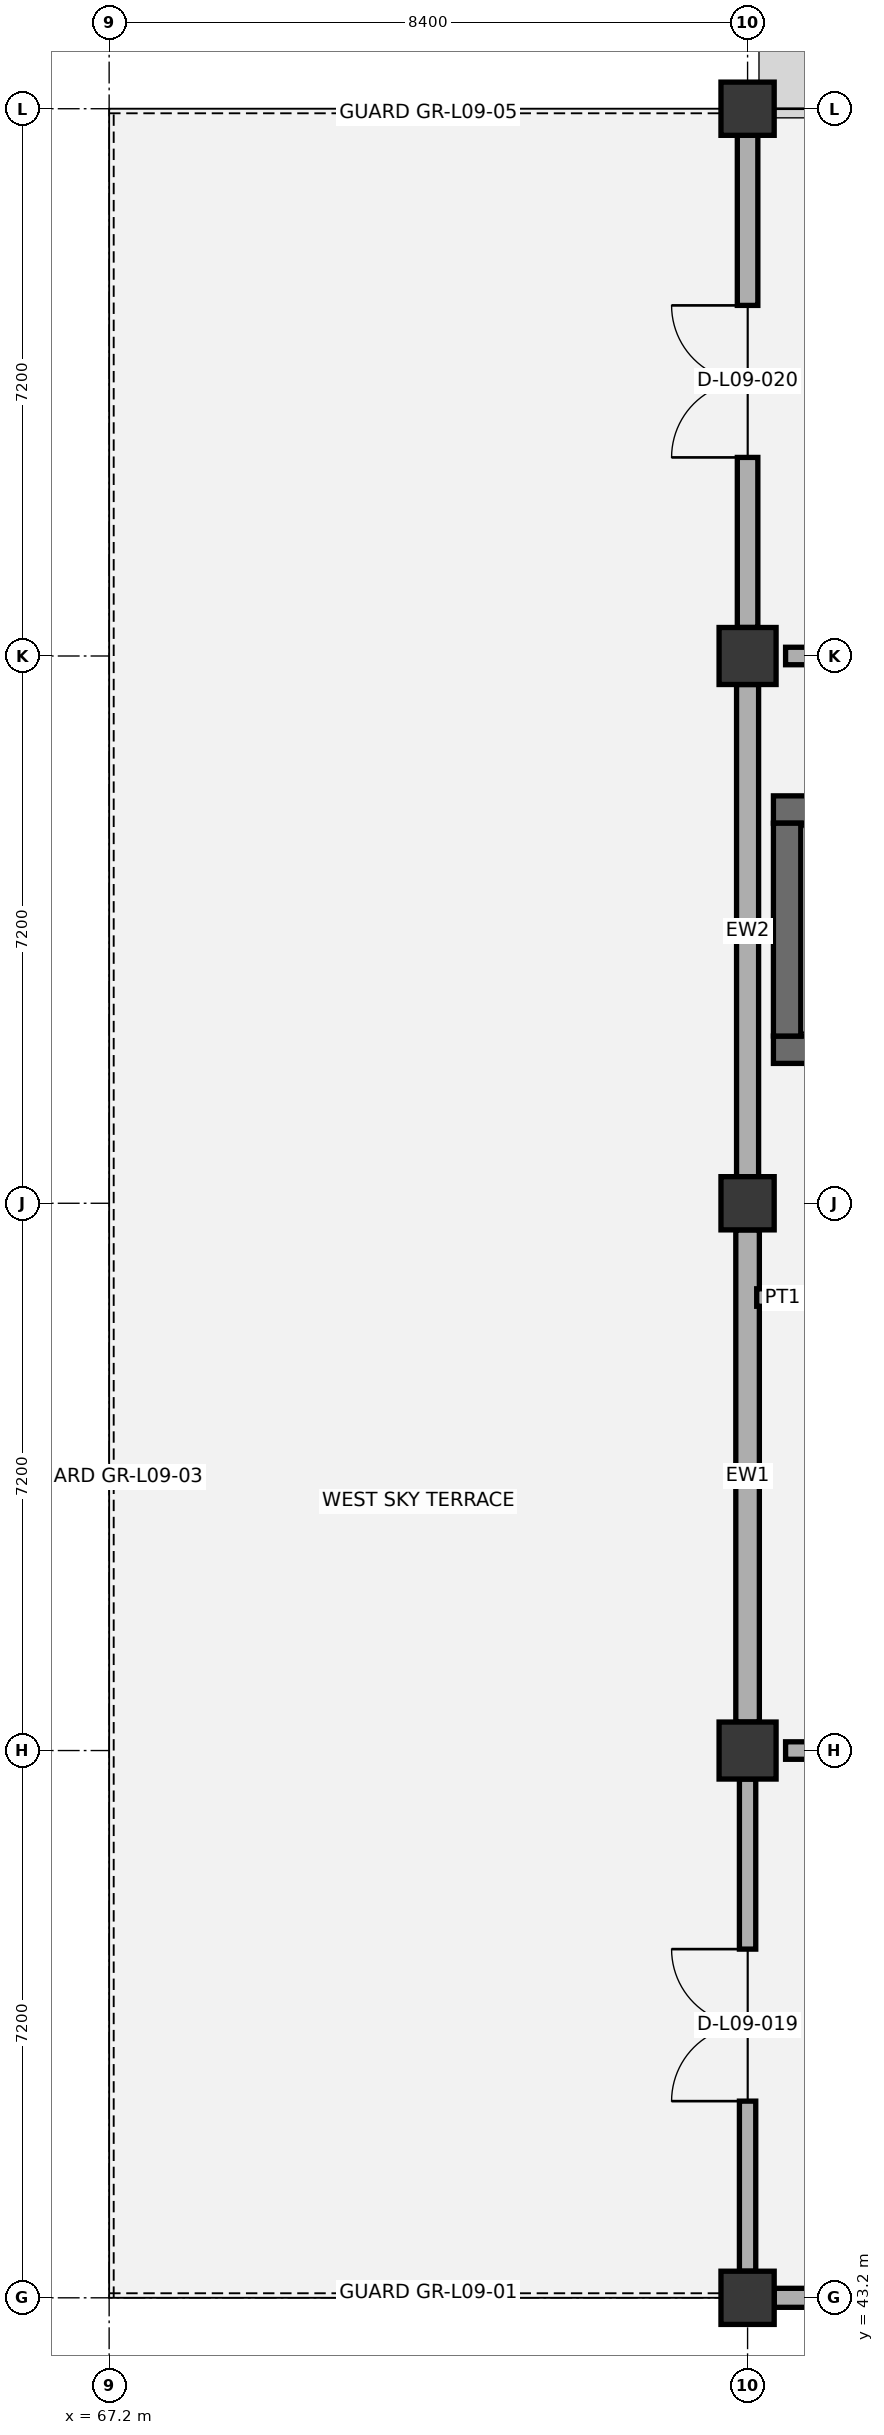
"""IFC4 building model, lengths in metres.
Left out: names, types, materials, properties, quantities, classifications, styles, units other than length and angle.
Written with IfcOpenShell. Run it as: python <this file> out.ifc"""

import sys

from ifc_helpers import new_model, si_unit, direction, frame, frame_2d, origin, origin_2d, place, context, subcontext, project, spatial, rectangle, extrude, element, fill, save


model = new_model("IFC4")
c1 = context("Model", 3, precision=1e-05, world=origin(), true_north=direction((0.0, 1.0)))
c2 = subcontext(c1, "Body", "Model", "MODEL_VIEW")
j1 = project(units=[si_unit("LENGTHUNIT", "METRE"), si_unit("PLANEANGLEUNIT", "RADIAN")], contexts=[c1])
p1 = place(None, origin())
s1 = spatial("IfcSite", under=j1, at=p1, CompositionType="ELEMENT")
p2 = place(p1, origin())
s2 = spatial("IfcBuilding", under=s1, at=p2, CompositionType="ELEMENT")
p3 = place(p2, frame((0.0, 0.0, 43.8)))
s3 = spatial("IfcBuildingStorey", under=s2, at=p3, CompositionType="ELEMENT", Elevation=43.8)
p4 = place(p3, frame((75.6, 43.2, 0.0), z_axis=(0.0, 0.0, 1.0), x_axis=(1.0, 0.0, 0.0)))
e1 = element("IfcColumn", 1, at=p4, inside=s3, PredefinedType="COLUMN", context=c2, shape_type="SweptSolid", body=[
    extrude(rectangle(XDim=0.7, YDim=0.7, at=origin_2d()), origin(), (0.0, 0.0, 1.0), 4.2),
])
p5 = place(p3, frame((75.6, 50.4, 0.0), z_axis=(0.0, 0.0, 1.0), x_axis=(1.0, 0.0, 0.0)))
e2 = element("IfcColumn", 2, at=p5, inside=s3, PredefinedType="COLUMN", context=c2, shape_type="SweptSolid", body=[
    extrude(rectangle(XDim=0.75, YDim=0.75, at=origin_2d()), origin(), (0.0, 0.0, 1.0), 4.2),
])
p6 = place(p3, frame((75.6, 57.6, 0.0), z_axis=(0.0, 0.0, 1.0), x_axis=(1.0, 0.0, 0.0)))
e3 = element("IfcColumn", 3, at=p6, inside=s3, PredefinedType="COLUMN", context=c2, shape_type="SweptSolid", body=[
    extrude(rectangle(XDim=0.7, YDim=0.7, at=origin_2d()), origin(), (0.0, 0.0, 1.0), 4.2),
])
p7 = place(p3, frame((75.6, 64.8, 0.0), z_axis=(0.0, 0.0, 1.0), x_axis=(1.0, 0.0, 0.0)))
e4 = element("IfcColumn", 4, at=p7, inside=s3, PredefinedType="COLUMN", context=c2, shape_type="SweptSolid", body=[
    extrude(rectangle(XDim=0.75, YDim=0.75, at=origin_2d()), origin(), (0.0, 0.0, 1.0), 4.2),
])
p8 = place(p3, frame((75.6, 72.0, 0.0), z_axis=(0.0, 0.0, 1.0), x_axis=(1.0, 0.0, 0.0)))
e5 = element("IfcColumn", 5, at=p8, inside=s3, PredefinedType="COLUMN", context=c2, shape_type="SweptSolid", body=[
    extrude(rectangle(XDim=0.7, YDim=0.7, at=origin_2d()), origin(), (0.0, 0.0, 1.0), 4.2),
])
p9 = place(p3, frame((75.94, 62.78, 0.0), z_axis=(0.0, 0.0, 1.0), x_axis=(1.0, 0.0, 0.0)))
e6 = element("IfcWall", 6, at=p9, inside=s3, PredefinedType="SHEAR", context=c2, shape_type="SweptSolid", body=[
    extrude(rectangle(XDim=2.87, YDim=0.36, at=frame_2d((1.435, 0.0))), origin(), (0.0, 0.0, 1.0), 3.9),
])
p10 = place(p3, frame((75.94, 59.62, 0.0), z_axis=(0.0, 0.0, 1.0), x_axis=(1.0, 0.0, 0.0)))
e7 = element("IfcWall", 7, at=p10, inside=s3, PredefinedType="SHEAR", context=c2, shape_type="SweptSolid", body=[
    extrude(rectangle(XDim=2.87, YDim=0.36, at=frame_2d((1.435, 0.0))), origin(), (0.0, 0.0, 1.0), 3.9),
])
p11 = place(p10, frame((0.76, 0.0, 0.0)))
e8 = element("IfcOpeningElement", 8, at=p11, cuts=e7, PredefinedType="OPENING", context=c2, shape_type="SweptSolid", body=[
    extrude(rectangle(XDim=1.35, YDim=2.2, at=frame_2d((0.675, 1.1))), frame((0.0, 0.19, 0.0), z_axis=(0.0, -1.0, 0.0), x_axis=(1.0, 0.0, 0.0)), (0.0, 0.0, 1.0), 0.38),
])
p12 = place(p3, frame((76.12, 59.8, 0.0), z_axis=(0.0, 0.0, 1.0), x_axis=(0.0, 1.0, 0.0)))
e9 = element("IfcWall", 9, at=p12, inside=s3, PredefinedType="SHEAR", context=c2, shape_type="SweptSolid", body=[
    extrude(rectangle(XDim=2.8, YDim=0.36, at=frame_2d((1.4, 0.0))), origin(), (0.0, 0.0, 1.0), 3.9),
])
p13 = place(p3, frame((75.95, 43.2, 0.0), z_axis=(0.0, 0.0, 1.0), x_axis=(1.0, 0.0, 0.0)))
e10 = element("IfcWall", 10, at=p13, inside=s3, PredefinedType="SOLIDWALL", context=c2, shape_type="SweptSolid", body=[
    extrude(rectangle(XDim=7.675, YDim=0.25, at=frame_2d((3.837, 0.0))), origin(), (0.0, 0.0, 1.0), 3.345),
])
p14 = place(p13, frame((1.658, 0.0, 0.95)))
e11 = element("IfcOpeningElement", 11, at=p14, cuts=e10, PredefinedType="OPENING", context=c2, shape_type="SweptSolid", body=[
    extrude(rectangle(XDim=1.35, YDim=1.65, at=frame_2d((0.675, 0.825))), frame((0.0, 0.135, 0.0), z_axis=(0.0, -1.0, 0.0), x_axis=(1.0, 0.0, 0.0)), (0.0, 0.0, 1.0), 0.27),
])
p15 = place(p13, frame((4.667, 0.0, 0.95)))
e12 = element("IfcOpeningElement", 12, at=p15, cuts=e10, PredefinedType="OPENING", context=c2, shape_type="SweptSolid", body=[
    extrude(rectangle(XDim=1.35, YDim=1.65, at=frame_2d((0.675, 0.825))), frame((0.0, 0.135, 0.0), z_axis=(0.0, -1.0, 0.0), x_axis=(1.0, 0.0, 0.0)), (0.0, 0.0, 1.0), 0.27),
])
p16 = place(p3, frame((75.6, 43.55, 0.0), z_axis=(0.0, 0.0, 1.0), x_axis=(0.0, 1.0, 0.0)))
e13 = element("IfcWall", 13, at=p16, inside=s3, PredefinedType="SOLIDWALL", context=c2, shape_type="SweptSolid", body=[
    extrude(rectangle(XDim=6.475, YDim=0.215, at=frame_2d((3.237, 0.0))), origin(), (0.0, 0.0, 1.0), 3.345),
])
p17 = place(p16, frame((2.238, 0.0, 0.0)))
e14 = element("IfcOpeningElement", 14, at=p17, cuts=e13, PredefinedType="OPENING", context=c2, shape_type="SweptSolid", body=[
    extrude(rectangle(XDim=2.0, YDim=2.4, at=frame_2d((1.0, 1.2))), frame((0.0, 0.117, 0.0), z_axis=(0.0, -1.0, 0.0), x_axis=(1.0, 0.0, 0.0)), (0.0, 0.0, 1.0), 0.235),
])
p18 = place(p3, frame((75.6, 50.775, 0.0), z_axis=(0.0, 0.0, 1.0), x_axis=(0.0, 1.0, 0.0)))
e15 = element("IfcWall", 15, at=p18, inside=s3, PredefinedType="SOLIDWALL", context=c2, shape_type="SweptSolid", body=[
    extrude(rectangle(XDim=6.475, YDim=0.31, at=frame_2d((3.238, 0.0))), origin(), (0.0, 0.0, 1.0), 3.345),
])
p19 = place(p3, frame((75.6, 57.95, 0.0), z_axis=(0.0, 0.0, 1.0), x_axis=(0.0, 1.0, 0.0)))
e16 = element("IfcWall", 16, at=p19, inside=s3, PredefinedType="SOLIDWALL", context=c2, shape_type="SweptSolid", body=[
    extrude(rectangle(XDim=6.475, YDim=0.29, at=frame_2d((3.238, 0.0))), origin(), (0.0, 0.0, 1.0), 3.345),
])
p20 = place(p3, frame((75.6, 65.175, 0.0), z_axis=(0.0, 0.0, 1.0), x_axis=(0.0, 1.0, 0.0)))
e17 = element("IfcWall", 17, at=p20, inside=s3, PredefinedType="SOLIDWALL", context=c2, shape_type="SweptSolid", body=[
    extrude(rectangle(XDim=6.475, YDim=0.27, at=frame_2d((3.237, 0.0))), origin(), (0.0, 0.0, 1.0), 3.345),
])
p21 = place(p20, frame((2.238, 0.0, 0.0)))
e18 = element("IfcOpeningElement", 18, at=p21, cuts=e17, PredefinedType="OPENING", context=c2, shape_type="SweptSolid", body=[
    extrude(rectangle(XDim=2.0, YDim=2.4, at=frame_2d((1.0, 1.2))), frame((0.0, 0.145, 0.0), z_axis=(0.0, -1.0, 0.0), x_axis=(1.0, 0.0, 0.0)), (0.0, 0.0, 1.0), 0.29),
])
p22 = place(p3, frame((76.1, 50.4, 0.0), z_axis=(0.0, 0.0, 1.0), x_axis=(1.0, 0.0, 0.0)))
e19 = element("IfcWall", 19, at=p22, inside=s3, PredefinedType="PARTITIONING", context=c2, shape_type="SweptSolid", body=[
    extrude(rectangle(XDim=7.4, YDim=0.23, at=frame_2d((3.7, 0.0))), origin(), (0.0, 0.0, 1.0), 3.625),
])
p23 = place(p22, frame((2.95, 0.0, 0.0)))
e20 = element("IfcOpeningElement", 20, at=p23, cuts=e19, PredefinedType="OPENING", context=c2, shape_type="SweptSolid", body=[
    extrude(rectangle(XDim=1.5, YDim=2.15, at=frame_2d((0.75, 1.075))), frame((0.0, 0.125, 0.0), z_axis=(0.0, -1.0, 0.0), x_axis=(1.0, 0.0, 0.0)), (0.0, 0.0, 1.0), 0.25),
])
p24 = place(p3, frame((75.72, 56.36, 0.0), z_axis=(0.0, 0.0, 1.0), x_axis=(1.0, 0.0, 0.0)))
e21 = element("IfcWall", 21, at=p24, inside=s3, PredefinedType="PARTITIONING", context=c2, shape_type="SweptSolid", body=[
    extrude(rectangle(XDim=0.68, YDim=0.23, at=frame_2d((0.34, 0.0))), origin(), (0.0, 0.0, 1.0), 3.9),
])
p25 = place(p3, frame((76.1, 64.8, 0.0), z_axis=(0.0, 0.0, 1.0), x_axis=(1.0, 0.0, 0.0)))
e22 = element("IfcWall", 22, at=p25, inside=s3, PredefinedType="PARTITIONING", context=c2, shape_type="SweptSolid", body=[
    extrude(rectangle(XDim=7.4, YDim=0.23, at=frame_2d((3.7, 0.0))), origin(), (0.0, 0.0, 1.0), 3.625),
])
p26 = place(p17, origin())
e23 = element("IfcDoor", 23, at=p26, inside=s3, OperationType="DOUBLE_DOOR_SINGLE_SWING", PredefinedType="DOOR", context=c2, shape_type="SweptSolid", body=[
    extrude(rectangle(XDim=2.0, YDim=2.4, at=frame_2d((1.0, 1.2))), frame((0.0, 0.025, 0.0), z_axis=(0.0, -1.0, 0.0), x_axis=(1.0, 0.0, 0.0)), (0.0, 0.0, 1.0), 0.05),
])
fill(e14, e23)
p27 = place(p21, origin())
e24 = element("IfcDoor", 24, at=p27, inside=s3, OperationType="DOUBLE_DOOR_SINGLE_SWING", PredefinedType="DOOR", context=c2, shape_type="SweptSolid", body=[
    extrude(rectangle(XDim=2.0, YDim=2.4, at=frame_2d((1.0, 1.2))), frame((0.0, 0.025, 0.0), z_axis=(0.0, -1.0, 0.0), x_axis=(1.0, 0.0, 0.0)), (0.0, 0.0, 1.0), 0.05),
])
fill(e18, e24)
save(model, sys.argv[1])
